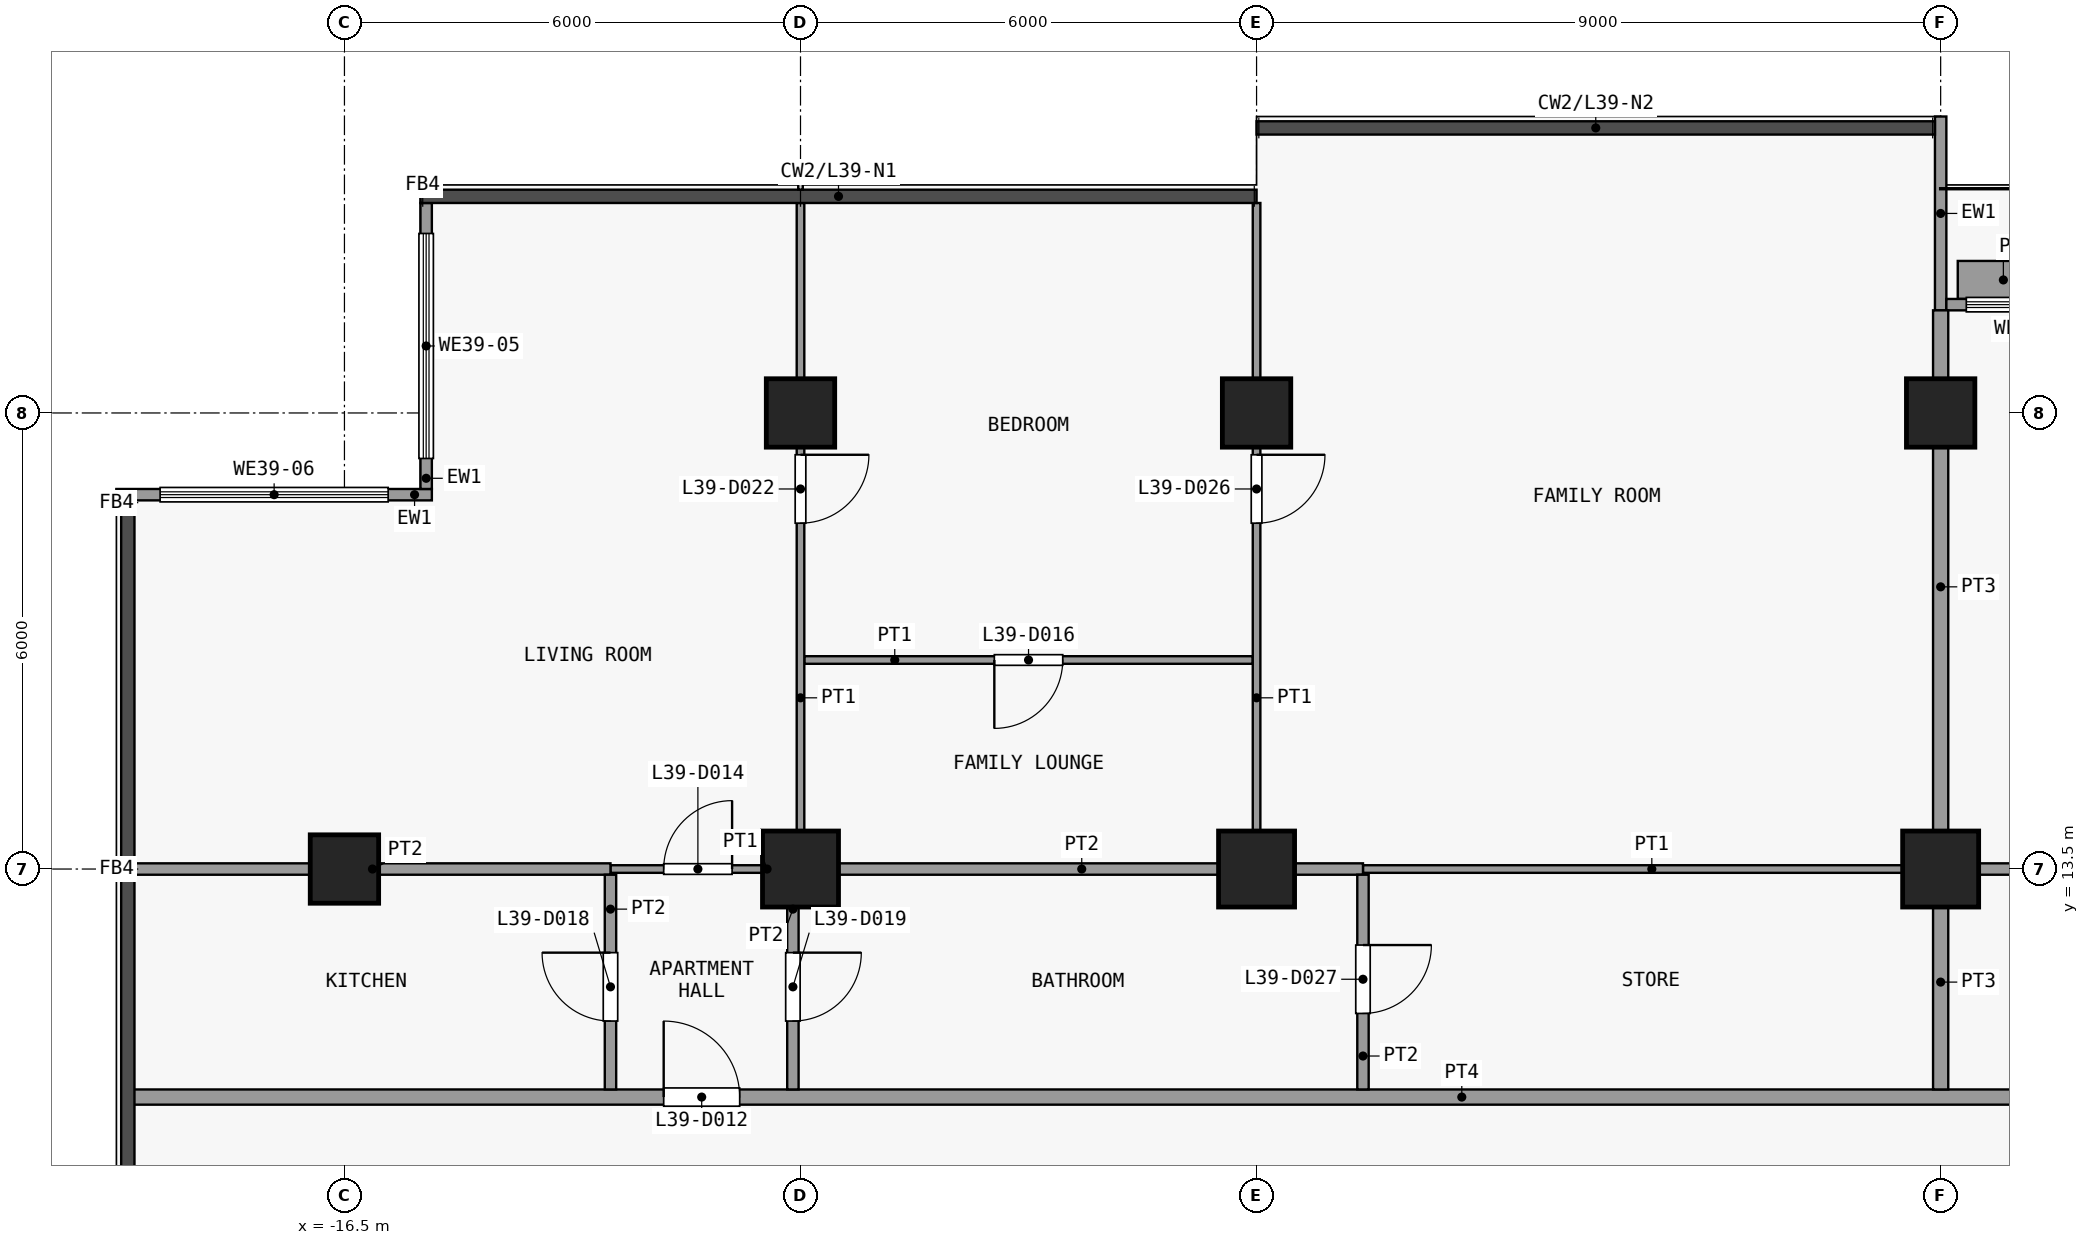
"""IFC4 building model, lengths in metres.
Left out: names, types, materials, properties, quantities, classifications, styles, units other than length and angle.
Written with IfcOpenShell. Run it as: python <this file> out.ifc"""

import sys

from ifc_helpers import new_model, si_unit, direction, frame, frame_2d, origin, origin_2d, place, context, subcontext, project, spatial, rectangle, extrude, element, fill, save


model = new_model("IFC4")
c1 = context("Model", 3, precision=1e-05, world=origin(), true_north=direction((0.0, 1.0)))
c2 = subcontext(c1, "Body", "Model", "MODEL_VIEW")
j1 = project(units=[si_unit("LENGTHUNIT", "METRE"), si_unit("PLANEANGLEUNIT", "RADIAN")], contexts=[c1])
p1 = place(None, origin())
s1 = spatial("IfcSite", under=j1, at=p1, CompositionType="ELEMENT")
p2 = place(p1, origin())
s2 = spatial("IfcBuilding", under=s1, at=p2, CompositionType="ELEMENT")
p3 = place(p2, frame((0.0, 0.0, 160.1)))
s3 = spatial("IfcBuildingStorey", under=s2, at=p3, CompositionType="ELEMENT", Elevation=160.1)
p4 = place(p3, frame((-16.5, 13.5, 0.0), z_axis=(0.0, 0.0, 1.0), x_axis=(1.0, 0.0, 0.0)))
e1 = element("IfcColumn", 1, at=p4, inside=s3, PredefinedType="COLUMN", context=c2, shape_type="SweptSolid", body=[
    extrude(rectangle(XDim=0.9, YDim=0.9, at=origin_2d()), origin(), (0.0, 0.0, 1.0), 3.6),
])
p5 = place(p3, frame((-10.5, 13.5, 0.0), z_axis=(0.0, 0.0, 1.0), x_axis=(1.0, 0.0, 0.0)))
e2 = element("IfcColumn", 2, at=p5, inside=s3, PredefinedType="COLUMN", context=c2, shape_type="SweptSolid", body=[
    extrude(rectangle(XDim=1.0, YDim=1.0, at=origin_2d()), origin(), (0.0, 0.0, 1.0), 3.6),
])
p6 = place(p3, frame((-10.5, 19.5, 0.0), z_axis=(0.0, 0.0, 1.0), x_axis=(1.0, 0.0, 0.0)))
e3 = element("IfcColumn", 3, at=p6, inside=s3, PredefinedType="COLUMN", context=c2, shape_type="SweptSolid", body=[
    extrude(rectangle(XDim=0.9, YDim=0.9, at=origin_2d()), origin(), (0.0, 0.0, 1.0), 3.6),
])
p7 = place(p3, frame((-4.5, 13.5, 0.0), z_axis=(0.0, 0.0, 1.0), x_axis=(1.0, 0.0, 0.0)))
e4 = element("IfcColumn", 4, at=p7, inside=s3, PredefinedType="COLUMN", context=c2, shape_type="SweptSolid", body=[
    extrude(rectangle(XDim=1.0, YDim=1.0, at=origin_2d()), origin(), (0.0, 0.0, 1.0), 3.6),
])
p8 = place(p3, frame((-4.5, 19.5, 0.0), z_axis=(0.0, 0.0, 1.0), x_axis=(1.0, 0.0, 0.0)))
e5 = element("IfcColumn", 5, at=p8, inside=s3, PredefinedType="COLUMN", context=c2, shape_type="SweptSolid", body=[
    extrude(rectangle(XDim=0.9, YDim=0.9, at=origin_2d()), origin(), (0.0, 0.0, 1.0), 3.6),
])
p9 = place(p3, frame((4.5, 13.5, 0.0), z_axis=(0.0, 0.0, 1.0), x_axis=(1.0, 0.0, 0.0)))
e6 = element("IfcColumn", 6, at=p9, inside=s3, PredefinedType="COLUMN", context=c2, shape_type="SweptSolid", body=[
    extrude(rectangle(XDim=1.0, YDim=1.0, at=origin_2d()), origin(), (0.0, 0.0, 1.0), 3.6),
])
p10 = place(p3, frame((4.5, 19.5, 0.0), z_axis=(0.0, 0.0, 1.0), x_axis=(1.0, 0.0, 0.0)))
e7 = element("IfcColumn", 7, at=p10, inside=s3, PredefinedType="COLUMN", context=c2, shape_type="SweptSolid", body=[
    extrude(rectangle(XDim=0.9, YDim=0.9, at=origin_2d()), origin(), (0.0, 0.0, 1.0), 3.6),
])
p11 = place(p3, frame((-15.425, 18.5, 0.0), z_axis=(0.0, 0.0, 1.0), x_axis=(0.0, 1.0, 0.0)))
e8 = element("IfcWall", 8, at=p11, inside=s3, PredefinedType="SOLIDWALL", context=c2, shape_type="SweptSolid", body=[
    extrude(rectangle(XDim=3.762, YDim=0.15, at=frame_2d((1.881, 0.0))), origin(), (0.0, 0.0, 1.0), 3.3),
])
p12 = place(p11, frame((0.401, 0.0, 0.9)))
e9 = element("IfcOpeningElement", 9, at=p12, cuts=e8, PredefinedType="OPENING", context=c2, shape_type="SweptSolid", body=[
    extrude(rectangle(XDim=2.96, YDim=2.4, at=frame_2d((1.48, 1.2))), frame((0.0, 0.085, 0.0), z_axis=(0.0, -1.0, 0.0), x_axis=(1.0, 0.0, 0.0)), (0.0, 0.0, 1.0), 0.17),
])
p13 = place(p3, frame((-19.5, 18.425, 0.0), z_axis=(0.0, 0.0, 1.0), x_axis=(1.0, 0.0, 0.0)))
e10 = element("IfcWall", 10, at=p13, inside=s3, PredefinedType="SOLIDWALL", context=c2, shape_type="SweptSolid", body=[
    extrude(rectangle(XDim=4.15, YDim=0.15, at=frame_2d((2.075, 0.0))), origin(), (0.0, 0.0, 1.0), 3.3),
])
p14 = place(p13, frame((0.575, 0.0, 0.9)))
e11 = element("IfcOpeningElement", 11, at=p14, cuts=e10, PredefinedType="OPENING", context=c2, shape_type="SweptSolid", body=[
    extrude(rectangle(XDim=3.0, YDim=2.4, at=frame_2d((1.5, 1.2))), frame((0.0, 0.085, 0.0), z_axis=(0.0, -1.0, 0.0), x_axis=(1.0, 0.0, 0.0)), (0.0, 0.0, 1.0), 0.17),
])
p15 = place(p3, frame((4.5, 20.85, 0.0), z_axis=(0.0, 0.0, 1.0), x_axis=(0.0, 1.0, 0.0)))
e12 = element("IfcWall", 12, at=p15, inside=s3, PredefinedType="SOLIDWALL", context=c2, shape_type="SweptSolid", body=[
    extrude(rectangle(XDim=2.55, YDim=0.15, at=frame_2d((1.275, 0.0))), origin(), (0.0, 0.0, 1.0), 3.3),
])
p16 = place(p3, frame((4.575, 20.925, 0.0), z_axis=(0.0, 0.0, 1.0), x_axis=(1.0, 0.0, 0.0)))
e13 = element("IfcWall", 13, at=p16, inside=s3, PredefinedType="SOLIDWALL", context=c2, shape_type="SweptSolid", body=[
    extrude(rectangle(XDim=5.85, YDim=0.15, at=frame_2d((2.925, 0.0))), origin(), (0.0, 0.0, 1.0), 3.3),
])
p17 = place(p16, frame((2.325, 0.0, 0.0)))
e14 = element("IfcOpeningElement", 14, at=p17, cuts=e13, PredefinedType="OPENING", context=c2, shape_type="SweptSolid", body=[
    extrude(rectangle(XDim=1.2, YDim=2.4, at=frame_2d((0.6, 1.2))), frame((0.0, 0.085, 0.0), z_axis=(0.0, -1.0, 0.0), x_axis=(1.0, 0.0, 0.0)), (0.0, 0.0, 1.0), 0.17),
])
p18 = place(p16, frame((0.262, 0.0, 0.9)))
e15 = element("IfcOpeningElement", 15, at=p18, cuts=e13, PredefinedType="OPENING", context=c2, shape_type="SweptSolid", body=[
    extrude(rectangle(XDim=1.8, YDim=2.1, at=frame_2d((0.9, 1.05))), frame((0.0, 0.085, 0.0), z_axis=(0.0, -1.0, 0.0), x_axis=(1.0, 0.0, 0.0)), (0.0, 0.0, 1.0), 0.17),
])
p19 = place(p16, frame((3.788, 0.0, 0.9)))
e16 = element("IfcOpeningElement", 16, at=p19, cuts=e13, PredefinedType="OPENING", context=c2, shape_type="SweptSolid", body=[
    extrude(rectangle(XDim=1.8, YDim=2.1, at=frame_2d((0.9, 1.05))), frame((0.0, 0.085, 0.0), z_axis=(0.0, -1.0, 0.0), x_axis=(1.0, 0.0, 0.0)), (0.0, 0.0, 1.0), 0.17),
])
p20 = place(p3, frame((4.725, 21.25, 0.0), z_axis=(0.0, 0.0, 1.0), x_axis=(1.0, 0.0, 0.0)))
e17 = element("IfcWall", 17, at=p20, inside=s3, PredefinedType="USERDEFINED", context=c2, shape_type="SweptSolid", body=[
    extrude(rectangle(XDim=1.2, YDim=0.5, at=frame_2d((0.6, 0.0))), origin(), (0.0, 0.0, 1.0), 0.9),
])
p21 = place(p3, frame((-19.35, 10.5, 0.0), z_axis=(0.0, 0.0, 1.0), x_axis=(1.0, 0.0, 0.0)))
e18 = element("IfcWall", 18, at=p21, inside=s3, PredefinedType="PARTITIONING", context=c2, shape_type="SweptSolid", body=[
    extrude(rectangle(XDim=37.2, YDim=0.2, at=frame_2d((18.6, 0.0))), origin(), (0.0, 0.0, 1.0), 3.3),
])
p22 = place(p21, frame((7.05, 0.0, 0.0)))
e19 = element("IfcOpeningElement", 19, at=p22, cuts=e18, PredefinedType="OPENING", context=c2, shape_type="SweptSolid", body=[
    extrude(rectangle(XDim=1.0, YDim=2.1, at=frame_2d((0.5, 1.05))), frame((0.0, 0.11, 0.0), z_axis=(0.0, -1.0, 0.0), x_axis=(1.0, 0.0, 0.0)), (0.0, 0.0, 1.0), 0.22),
])
p23 = place(p21, frame((27.05, 0.0, 0.0)))
e20 = element("IfcOpeningElement", 20, at=p23, cuts=e18, PredefinedType="OPENING", context=c2, shape_type="SweptSolid", body=[
    extrude(rectangle(XDim=1.0, YDim=2.1, at=frame_2d((0.5, 1.05))), frame((0.0, 0.11, 0.0), z_axis=(0.0, -1.0, 0.0), x_axis=(1.0, 0.0, 0.0)), (0.0, 0.0, 1.0), 0.22),
])
p24 = place(p3, frame((-13.0, 13.5, 0.0), z_axis=(0.0, 0.0, 1.0), x_axis=(1.0, 0.0, 0.0)))
e21 = element("IfcWall", 21, at=p24, inside=s3, PredefinedType="PARTITIONING", context=c2, shape_type="SweptSolid", body=[
    extrude(rectangle(XDim=2.4, YDim=0.1, at=frame_2d((1.2, 0.0))), origin(), (0.0, 0.0, 1.0), 3.3),
])
p25 = place(p24, frame((0.7, 0.0, 0.0)))
e22 = element("IfcOpeningElement", 22, at=p25, cuts=e21, PredefinedType="OPENING", context=c2, shape_type="SweptSolid", body=[
    extrude(rectangle(XDim=0.9, YDim=2.1, at=frame_2d((0.45, 1.05))), frame((0.0, 0.06, 0.0), z_axis=(0.0, -1.0, 0.0), x_axis=(1.0, 0.0, 0.0)), (0.0, 0.0, 1.0), 0.12),
])
p26 = place(p3, frame((-3.1, 13.5, 0.0), z_axis=(0.0, 0.0, 1.0), x_axis=(1.0, 0.0, 0.0)))
e23 = element("IfcWall", 23, at=p26, inside=s3, PredefinedType="PARTITIONING", context=c2, shape_type="SweptSolid", body=[
    extrude(rectangle(XDim=7.6, YDim=0.1, at=frame_2d((3.8, 0.0))), origin(), (0.0, 0.0, 1.0), 3.3),
])
p27 = place(p3, frame((-19.262, 13.5, 0.0), z_axis=(0.0, 0.0, 1.0), x_axis=(1.0, 0.0, 0.0)))
e24 = element("IfcWall", 24, at=p27, inside=s3, PredefinedType="PARTITIONING", context=c2, shape_type="SweptSolid", body=[
    extrude(rectangle(XDim=6.262, YDim=0.15, at=frame_2d((3.131, 0.0))), origin(), (0.0, 0.0, 1.0), 3.3),
])
p28 = place(p3, frame((-10.5, 13.5, 0.0), z_axis=(0.0, 0.0, 1.0), x_axis=(1.0, 0.0, 0.0)))
e25 = element("IfcWall", 25, at=p28, inside=s3, PredefinedType="PARTITIONING", context=c2, shape_type="SweptSolid", body=[
    extrude(rectangle(XDim=7.4, YDim=0.15, at=frame_2d((3.7, 0.0))), origin(), (0.0, 0.0, 1.0), 3.3),
])
p29 = place(p3, frame((4.5, 13.5, 0.0), z_axis=(0.0, 0.0, 1.0), x_axis=(1.0, 0.0, 0.0)))
e26 = element("IfcWall", 26, at=p29, inside=s3, PredefinedType="PARTITIONING", context=c2, shape_type="SweptSolid", body=[
    extrude(rectangle(XDim=2.5, YDim=0.15, at=frame_2d((1.25, 0.0))), origin(), (0.0, 0.0, 1.0), 3.3),
])
p30 = place(p3, frame((-10.45, 16.25, 0.0), z_axis=(0.0, 0.0, 1.0), x_axis=(1.0, 0.0, 0.0)))
e27 = element("IfcWall", 27, at=p30, inside=s3, PredefinedType="PARTITIONING", context=c2, shape_type="SweptSolid", body=[
    extrude(rectangle(XDim=5.9, YDim=0.1, at=frame_2d((2.95, 0.0))), origin(), (0.0, 0.0, 1.0), 3.3),
])
p31 = place(p30, frame((2.5, 0.0, 0.0)))
e28 = element("IfcOpeningElement", 28, at=p31, cuts=e27, PredefinedType="OPENING", context=c2, shape_type="SweptSolid", body=[
    extrude(rectangle(XDim=0.9, YDim=2.1, at=frame_2d((0.45, 1.05))), frame((0.0, 0.06, 0.0), z_axis=(0.0, -1.0, 0.0), x_axis=(1.0, 0.0, 0.0)), (0.0, 0.0, 1.0), 0.12),
])
p32 = place(p3, frame((-13.0, 10.6, 0.0), z_axis=(0.0, 0.0, 1.0), x_axis=(0.0, 1.0, 0.0)))
e29 = element("IfcWall", 29, at=p32, inside=s3, PredefinedType="PARTITIONING", context=c2, shape_type="SweptSolid", body=[
    extrude(rectangle(XDim=2.825, YDim=0.15, at=frame_2d((1.413, 0.0))), origin(), (0.0, 0.0, 1.0), 3.3),
])
p33 = place(p32, frame((0.9, 0.0, 0.0)))
e30 = element("IfcOpeningElement", 30, at=p33, cuts=e29, PredefinedType="OPENING", context=c2, shape_type="SweptSolid", body=[
    extrude(rectangle(XDim=0.9, YDim=2.1, at=frame_2d((0.45, 1.05))), frame((0.0, 0.085, 0.0), z_axis=(0.0, -1.0, 0.0), x_axis=(1.0, 0.0, 0.0)), (0.0, 0.0, 1.0), 0.17),
])
p34 = place(p3, frame((-10.6, 10.6, 0.0), z_axis=(0.0, 0.0, 1.0), x_axis=(0.0, 1.0, 0.0)))
e31 = element("IfcWall", 31, at=p34, inside=s3, PredefinedType="PARTITIONING", context=c2, shape_type="SweptSolid", body=[
    extrude(rectangle(XDim=2.825, YDim=0.15, at=frame_2d((1.413, 0.0))), origin(), (0.0, 0.0, 1.0), 3.3),
])
p35 = place(p34, frame((0.9, 0.0, 0.0)))
e32 = element("IfcOpeningElement", 32, at=p35, cuts=e31, PredefinedType="OPENING", context=c2, shape_type="SweptSolid", body=[
    extrude(rectangle(XDim=0.9, YDim=2.1, at=frame_2d((0.45, 1.05))), frame((0.0, 0.085, 0.0), z_axis=(0.0, -1.0, 0.0), x_axis=(1.0, 0.0, 0.0)), (0.0, 0.0, 1.0), 0.17),
])
p36 = place(p3, frame((-10.5, 13.575, 0.0), z_axis=(0.0, 0.0, 1.0), x_axis=(0.0, 1.0, 0.0)))
e33 = element("IfcWall", 33, at=p36, inside=s3, PredefinedType="PARTITIONING", context=c2, shape_type="SweptSolid", body=[
    extrude(rectangle(XDim=8.688, YDim=0.1, at=frame_2d((4.344, 0.0))), origin(), (0.0, 0.0, 1.0), 3.3),
])
p37 = place(p36, frame((4.475, 0.0, 0.0)))
e34 = element("IfcOpeningElement", 34, at=p37, cuts=e33, PredefinedType="OPENING", context=c2, shape_type="SweptSolid", body=[
    extrude(rectangle(XDim=0.9, YDim=2.1, at=frame_2d((0.45, 1.05))), frame((0.0, 0.06, 0.0), z_axis=(0.0, -1.0, 0.0), x_axis=(1.0, 0.0, 0.0)), (0.0, 0.0, 1.0), 0.12),
])
p38 = place(p3, frame((-4.5, 13.575, 0.0), z_axis=(0.0, 0.0, 1.0), x_axis=(0.0, 1.0, 0.0)))
e35 = element("IfcWall", 35, at=p38, inside=s3, PredefinedType="PARTITIONING", context=c2, shape_type="SweptSolid", body=[
    extrude(rectangle(XDim=8.688, YDim=0.1, at=frame_2d((4.344, 0.0))), origin(), (0.0, 0.0, 1.0), 3.3),
])
p39 = place(p38, frame((4.475, 0.0, 0.0)))
e36 = element("IfcOpeningElement", 36, at=p39, cuts=e35, PredefinedType="OPENING", context=c2, shape_type="SweptSolid", body=[
    extrude(rectangle(XDim=0.9, YDim=2.1, at=frame_2d((0.45, 1.05))), frame((0.0, 0.06, 0.0), z_axis=(0.0, -1.0, 0.0), x_axis=(1.0, 0.0, 0.0)), (0.0, 0.0, 1.0), 0.12),
])
p40 = place(p3, frame((-3.1, 10.6, 0.0), z_axis=(0.0, 0.0, 1.0), x_axis=(0.0, 1.0, 0.0)))
e37 = element("IfcWall", 37, at=p40, inside=s3, PredefinedType="PARTITIONING", context=c2, shape_type="SweptSolid", body=[
    extrude(rectangle(XDim=2.825, YDim=0.15, at=frame_2d((1.413, 0.0))), origin(), (0.0, 0.0, 1.0), 3.3),
])
p41 = place(p40, frame((1.0, 0.0, 0.0)))
e38 = element("IfcOpeningElement", 38, at=p41, cuts=e37, PredefinedType="OPENING", context=c2, shape_type="SweptSolid", body=[
    extrude(rectangle(XDim=0.9, YDim=2.1, at=frame_2d((0.45, 1.05))), frame((0.0, 0.085, 0.0), z_axis=(0.0, -1.0, 0.0), x_axis=(1.0, 0.0, 0.0)), (0.0, 0.0, 1.0), 0.17),
])
p42 = place(p3, frame((4.5, 10.6, 0.0), z_axis=(0.0, 0.0, 1.0), x_axis=(0.0, 1.0, 0.0)))
e39 = element("IfcWall", 39, at=p42, inside=s3, PredefinedType="PARTITIONING", context=c2, shape_type="SweptSolid", body=[
    extrude(rectangle(XDim=2.825, YDim=0.2, at=frame_2d((1.413, 0.0))), origin(), (0.0, 0.0, 1.0), 3.3),
])
p43 = place(p3, frame((4.5, 13.575, 0.0), z_axis=(0.0, 0.0, 1.0), x_axis=(0.0, 1.0, 0.0)))
e40 = element("IfcWall", 40, at=p43, inside=s3, PredefinedType="PARTITIONING", context=c2, shape_type="SweptSolid", body=[
    extrude(rectangle(XDim=7.275, YDim=0.2, at=frame_2d((3.638, 0.0))), origin(), (0.0, 0.0, 1.0), 3.3),
])
p44 = place(p12, origin())
e41 = element("IfcWindow", 41, at=p44, inside=s3, PartitioningType="SINGLE_PANEL", PredefinedType="WINDOW", context=c2, shape_type="SweptSolid", body=[
    extrude(rectangle(XDim=2.96, YDim=2.4, at=frame_2d((1.48, 1.2))), frame((0.0, 0.03, 0.0), z_axis=(0.0, -1.0, 0.0), x_axis=(1.0, 0.0, 0.0)), (0.0, 0.0, 1.0), 0.06),
])
fill(e9, e41)
p45 = place(p14, origin())
e42 = element("IfcWindow", 42, at=p45, inside=s3, PartitioningType="SINGLE_PANEL", PredefinedType="WINDOW", context=c2, shape_type="SweptSolid", body=[
    extrude(rectangle(XDim=3.0, YDim=2.4, at=frame_2d((1.5, 1.2))), frame((0.0, 0.03, 0.0), z_axis=(0.0, -1.0, 0.0), x_axis=(1.0, 0.0, 0.0)), (0.0, 0.0, 1.0), 0.06),
])
fill(e11, e42)
p46 = place(p18, origin())
e43 = element("IfcWindow", 43, at=p46, inside=s3, PartitioningType="SINGLE_PANEL", PredefinedType="WINDOW", context=c2, shape_type="SweptSolid", body=[
    extrude(rectangle(XDim=1.8, YDim=2.1, at=frame_2d((0.9, 1.05))), frame((0.0, 0.03, 0.0), z_axis=(0.0, -1.0, 0.0), x_axis=(1.0, 0.0, 0.0)), (0.0, 0.0, 1.0), 0.06),
])
fill(e15, e43)
p47 = place(p22, origin())
e44 = element("IfcDoor", 44, at=p47, inside=s3, OperationType="SINGLE_SWING_RIGHT", PredefinedType="DOOR", context=c2, shape_type="SweptSolid", body=[
    extrude(rectangle(XDim=1.0, YDim=2.1, at=frame_2d((0.5, 1.05))), frame((0.0, 0.025, 0.0), z_axis=(0.0, -1.0, 0.0), x_axis=(1.0, 0.0, 0.0)), (0.0, 0.0, 1.0), 0.05),
])
fill(e19, e44)
p48 = place(p25, origin())
e45 = element("IfcDoor", 45, at=p48, inside=s3, OperationType="SINGLE_SWING_LEFT", PredefinedType="DOOR", context=c2, shape_type="SweptSolid", body=[
    extrude(rectangle(XDim=0.9, YDim=2.1, at=frame_2d((0.45, 1.05))), frame((0.0, 0.025, 0.0), z_axis=(0.0, -1.0, 0.0), x_axis=(1.0, 0.0, 0.0)), (0.0, 0.0, 1.0), 0.05),
])
fill(e22, e45)
p49 = place(p31, origin())
e46 = element("IfcDoor", 46, at=p49, inside=s3, OperationType="SINGLE_SWING_LEFT", PredefinedType="DOOR", context=c2, shape_type="SweptSolid", body=[
    extrude(rectangle(XDim=0.9, YDim=2.1, at=frame_2d((0.45, 1.05))), frame((0.0, 0.025, 0.0), z_axis=(0.0, -1.0, 0.0), x_axis=(1.0, 0.0, 0.0)), (0.0, 0.0, 1.0), 0.05),
])
fill(e28, e46)
p50 = place(p33, origin())
e47 = element("IfcDoor", 47, at=p50, inside=s3, OperationType="SINGLE_SWING_LEFT", PredefinedType="DOOR", context=c2, shape_type="SweptSolid", body=[
    extrude(rectangle(XDim=0.9, YDim=2.1, at=frame_2d((0.45, 1.05))), frame((0.0, 0.025, 0.0), z_axis=(0.0, -1.0, 0.0), x_axis=(1.0, 0.0, 0.0)), (0.0, 0.0, 1.0), 0.05),
])
fill(e30, e47)
p51 = place(p35, origin())
e48 = element("IfcDoor", 48, at=p51, inside=s3, OperationType="SINGLE_SWING_RIGHT", PredefinedType="DOOR", context=c2, shape_type="SweptSolid", body=[
    extrude(rectangle(XDim=0.9, YDim=2.1, at=frame_2d((0.45, 1.05))), frame((0.0, 0.025, 0.0), z_axis=(0.0, -1.0, 0.0), x_axis=(1.0, 0.0, 0.0)), (0.0, 0.0, 1.0), 0.05),
])
fill(e32, e48)
p52 = place(p37, origin())
e49 = element("IfcDoor", 49, at=p52, inside=s3, OperationType="SINGLE_SWING_RIGHT", PredefinedType="DOOR", context=c2, shape_type="SweptSolid", body=[
    extrude(rectangle(XDim=0.9, YDim=2.1, at=frame_2d((0.45, 1.05))), frame((0.0, 0.025, 0.0), z_axis=(0.0, -1.0, 0.0), x_axis=(1.0, 0.0, 0.0)), (0.0, 0.0, 1.0), 0.05),
])
fill(e34, e49)
p53 = place(p39, origin())
e50 = element("IfcDoor", 50, at=p53, inside=s3, OperationType="SINGLE_SWING_RIGHT", PredefinedType="DOOR", context=c2, shape_type="SweptSolid", body=[
    extrude(rectangle(XDim=0.9, YDim=2.1, at=frame_2d((0.45, 1.05))), frame((0.0, 0.025, 0.0), z_axis=(0.0, -1.0, 0.0), x_axis=(1.0, 0.0, 0.0)), (0.0, 0.0, 1.0), 0.05),
])
fill(e36, e50)
p54 = place(p41, origin())
e51 = element("IfcDoor", 51, at=p54, inside=s3, OperationType="SINGLE_SWING_RIGHT", PredefinedType="DOOR", context=c2, shape_type="SweptSolid", body=[
    extrude(rectangle(XDim=0.9, YDim=2.1, at=frame_2d((0.45, 1.05))), frame((0.0, 0.025, 0.0), z_axis=(0.0, -1.0, 0.0), x_axis=(1.0, 0.0, 0.0)), (0.0, 0.0, 1.0), 0.05),
])
fill(e38, e51)
save(model, sys.argv[1])
